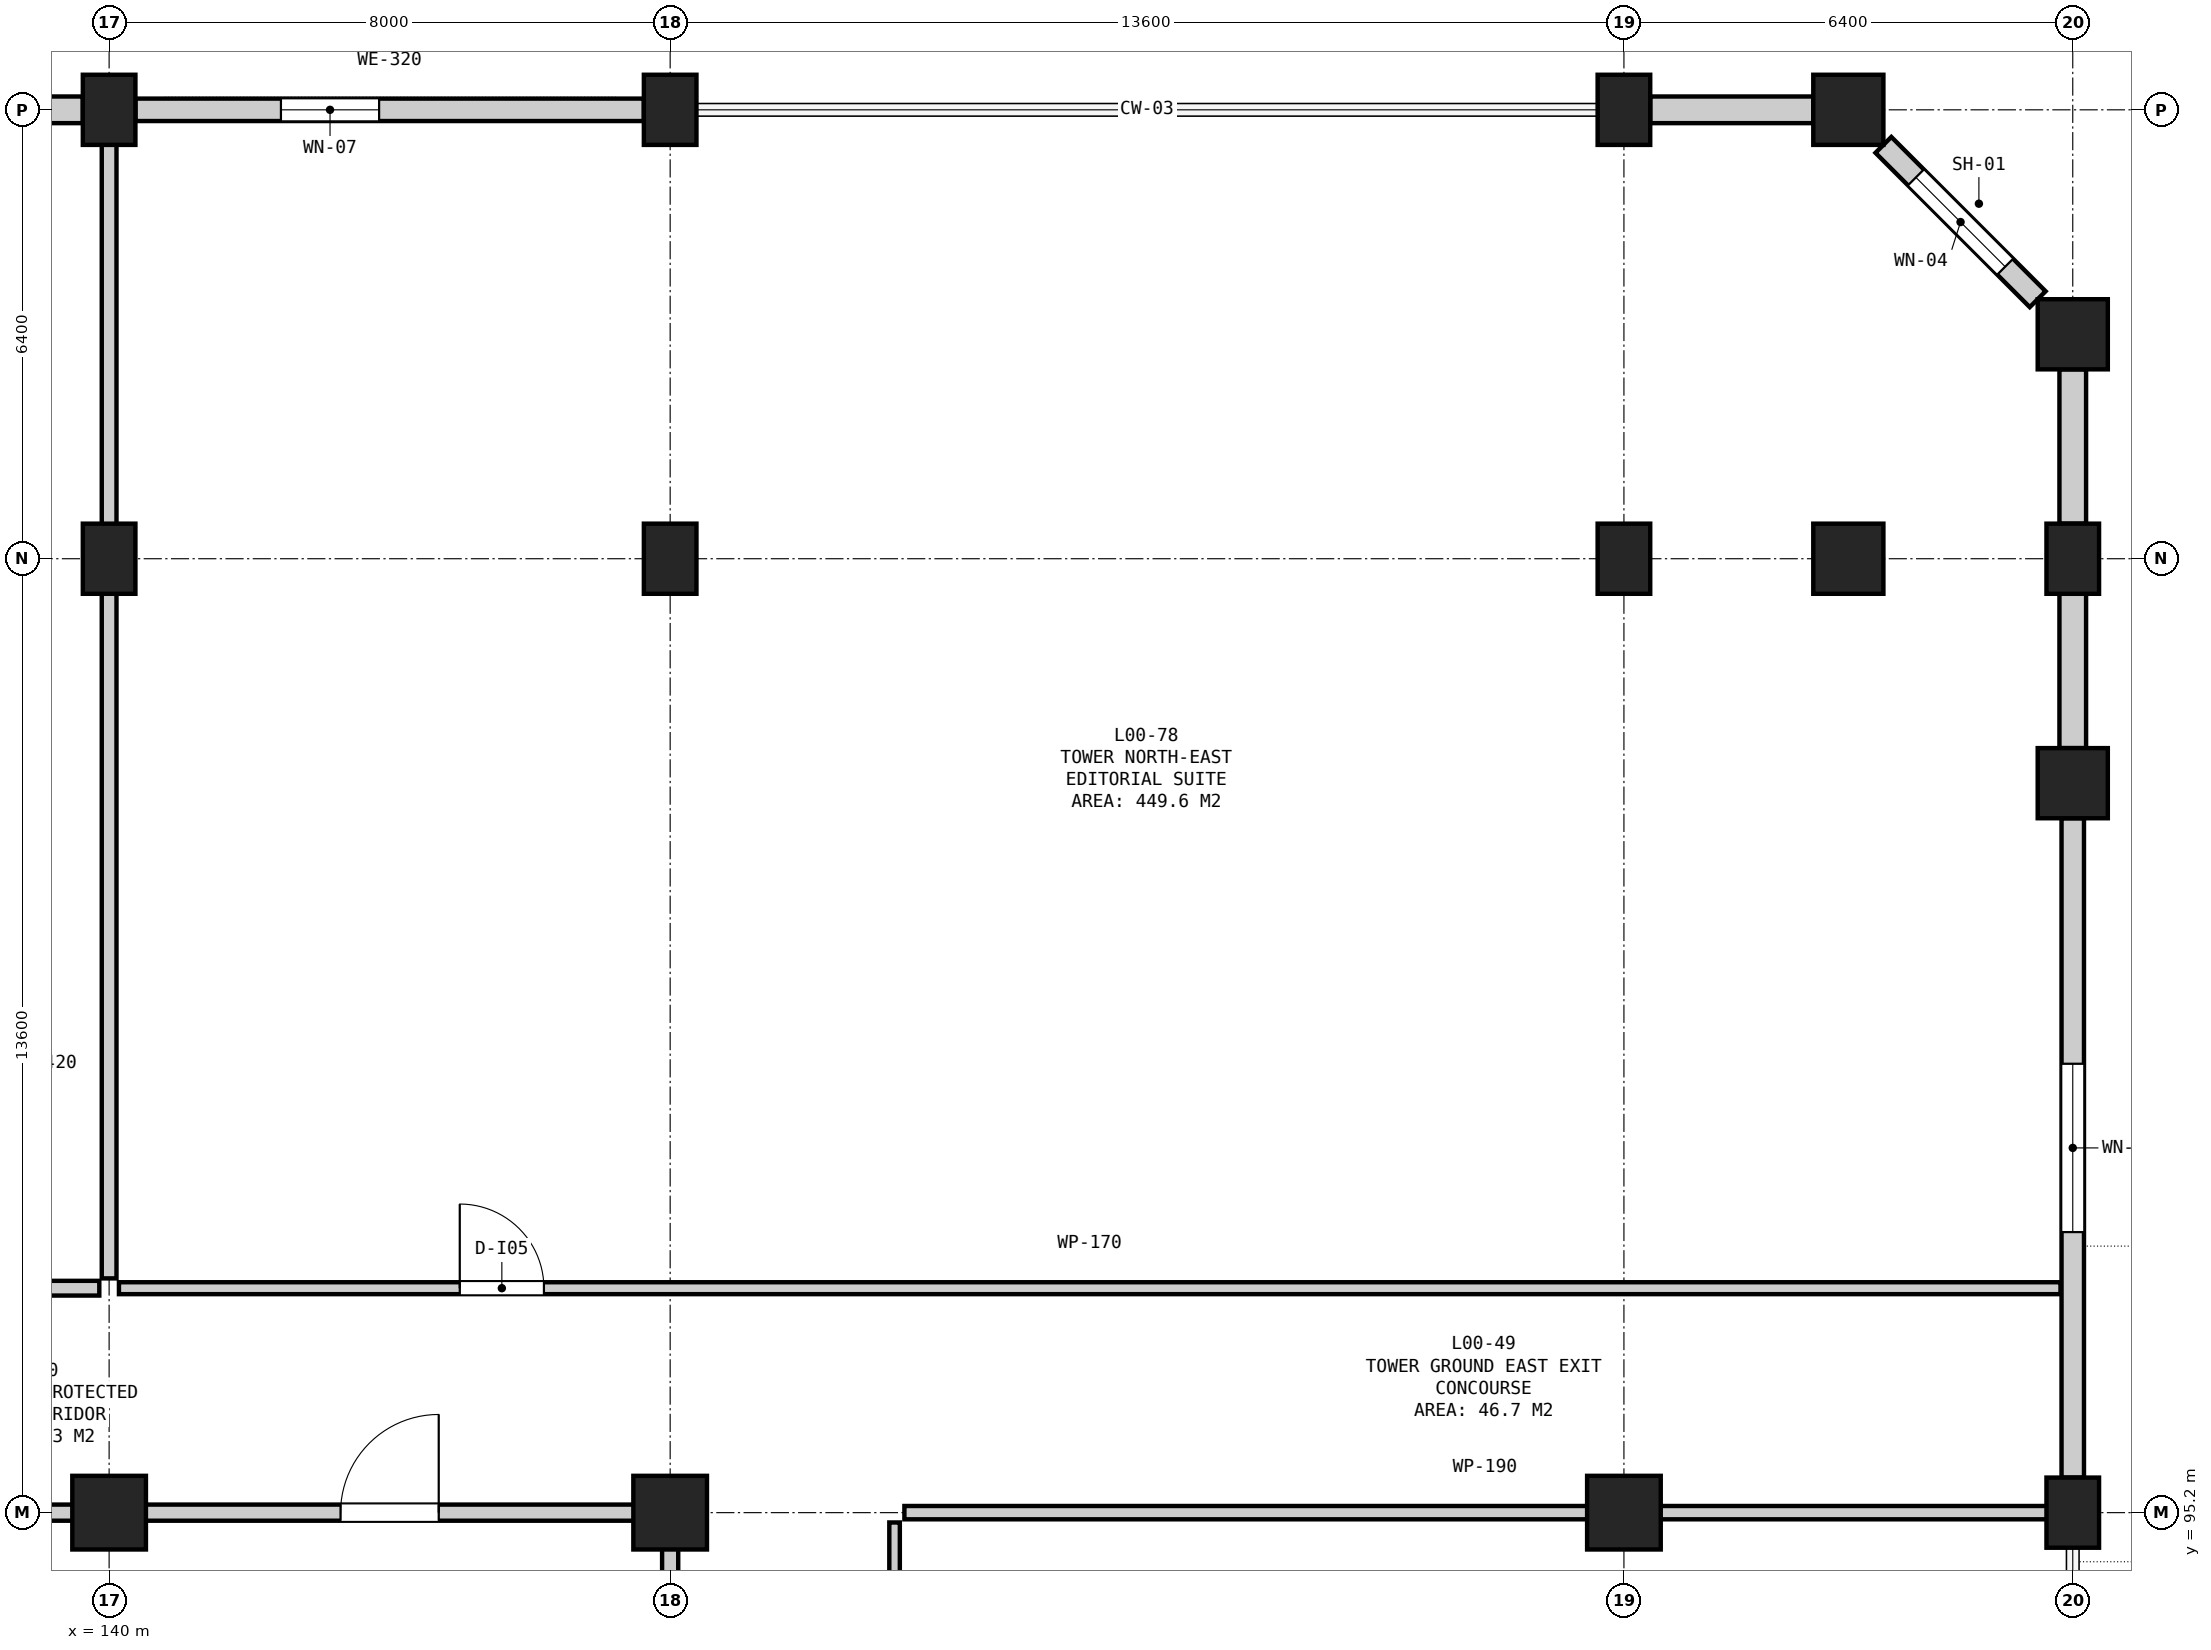
"""IFC4 building model, lengths in metres.
Left out: names, types, materials, properties, quantities, classifications, styles, units other than length and angle.
Written with IfcOpenShell. Run it as: python <this file> out.ifc"""

import sys

from ifc_helpers import new_model, si_unit, direction, frame, frame_2d, origin, origin_2d, place, context, subcontext, project, spatial, rectangle, circle, extrude, element, fill, save


model = new_model("IFC4")
c1 = context("Model", 3, precision=1e-05, world=origin(), true_north=direction((0.0, 1.0)))
c2 = subcontext(c1, "Body", "Model", "MODEL_VIEW")
j1 = project(units=[si_unit("LENGTHUNIT", "METRE"), si_unit("PLANEANGLEUNIT", "RADIAN")], contexts=[c1])
p1 = place(None, origin())
s1 = spatial("IfcSite", under=j1, at=p1, CompositionType="ELEMENT")
p2 = place(p1, origin())
s2 = spatial("IfcBuilding", under=s1, at=p2, CompositionType="ELEMENT")
p3 = place(p2, origin())
s3 = spatial("IfcBuildingStorey", under=s2, at=p3, CompositionType="ELEMENT", Elevation=0.0)
p4 = place(p3, frame((140.0, 95.2, 0.0), z_axis=(0.0, 0.0, 1.0), x_axis=(1.0, 0.0, 0.0)))
e1 = element("IfcColumn", 1, at=p4, inside=s3, PredefinedType="COLUMN", context=c2, shape_type="SweptSolid", body=[
    extrude(rectangle(XDim=1.05, YDim=1.05, at=origin_2d()), origin(), (0.0, 0.0, 1.0), 5.4),
])
for number, where, z_axis, x_axis in (
    (2, (140.0, 108.8, 0.0), (0.0, 0.0, 1.0), (1.0, 0.0, 0.0)),
    (3, (140.0, 115.2, 0.0), (0.0, 0.0, 1.0), (1.0, 0.0, 0.0)),
):
    element("IfcColumn", number, at=place(p3, frame(where, z_axis=z_axis, x_axis=x_axis)), inside=s3, PredefinedType="COLUMN", context=c2, shape_type="SweptSolid", body=[
        extrude(rectangle(XDim=0.75, YDim=1.0, at=origin_2d()), origin(), (0.0, 0.0, 1.0), 5.4),
    ])
p5 = place(p3, frame((148.0, 95.2, 0.0), z_axis=(0.0, 0.0, 1.0), x_axis=(1.0, 0.0, 0.0)))
e4 = element("IfcColumn", 4, at=p5, inside=s3, PredefinedType="COLUMN", context=c2, shape_type="SweptSolid", body=[
    extrude(rectangle(XDim=1.05, YDim=1.05, at=origin_2d()), origin(), (0.0, 0.0, 1.0), 5.4),
])
for number, where, z_axis, x_axis in (
    (5, (148.0, 108.8, 0.0), (0.0, 0.0, 1.0), (1.0, 0.0, 0.0)),
    (6, (148.0, 115.2, 0.0), (0.0, 0.0, 1.0), (1.0, 0.0, 0.0)),
):
    element("IfcColumn", number, at=place(p3, frame(where, z_axis=z_axis, x_axis=x_axis)), inside=s3, PredefinedType="COLUMN", context=c2, shape_type="SweptSolid", body=[
        extrude(rectangle(XDim=0.75, YDim=1.0, at=origin_2d()), origin(), (0.0, 0.0, 1.0), 5.4),
    ])
p6 = place(p3, frame((161.6, 95.2, 0.0), z_axis=(0.0, 0.0, 1.0), x_axis=(1.0, 0.0, 0.0)))
e7 = element("IfcColumn", 7, at=p6, inside=s3, PredefinedType="COLUMN", context=c2, shape_type="SweptSolid", body=[
    extrude(rectangle(XDim=1.05, YDim=1.05, at=origin_2d()), origin(), (0.0, 0.0, 1.0), 5.4),
])
for number, where, z_axis, x_axis in (
    (8, (161.6, 108.8, 0.0), (0.0, 0.0, 1.0), (1.0, 0.0, 0.0)),
    (9, (161.6, 115.2, 0.0), (0.0, 0.0, 1.0), (1.0, 0.0, 0.0)),
):
    element("IfcColumn", number, at=place(p3, frame(where, z_axis=z_axis, x_axis=x_axis)), inside=s3, PredefinedType="COLUMN", context=c2, shape_type="SweptSolid", body=[
        extrude(rectangle(XDim=0.75, YDim=1.0, at=origin_2d()), origin(), (0.0, 0.0, 1.0), 5.4),
    ])
for number, where, z_axis, x_axis in (
    (10, (164.8, 108.8, 0.0), (0.0, 0.0, 1.0), (1.0, 0.0, 0.0)),
    (11, (164.8, 115.2, 0.0), (0.0, 0.0, 1.0), (1.0, 0.0, 0.0)),
):
    element("IfcColumn", number, at=place(p3, frame(where, z_axis=z_axis, x_axis=x_axis)), inside=s3, PredefinedType="COLUMN", context=c2, shape_type="SweptSolid", body=[
        extrude(circle(Radius=0.5, at=origin_2d()), origin(), (0.0, 0.0, 1.0), 5.4),
    ])
p7 = place(p3, frame((168.0, 95.2, 0.0), z_axis=(0.0, 0.0, 1.0), x_axis=(1.0, 0.0, 0.0)))
e12 = element("IfcColumn", 12, at=p7, inside=s3, PredefinedType="COLUMN", context=c2, shape_type="SweptSolid", body=[
    extrude(rectangle(XDim=0.75, YDim=1.0, at=origin_2d()), origin(), (0.0, 0.0, 1.0), 5.4),
])
p8 = place(p3, frame((168.0, 105.6, 0.0), z_axis=(0.0, 0.0, 1.0), x_axis=(1.0, 0.0, 0.0)))
e13 = element("IfcColumn", 13, at=p8, inside=s3, PredefinedType="COLUMN", context=c2, shape_type="SweptSolid", body=[
    extrude(circle(Radius=0.5, at=origin_2d()), origin(), (0.0, 0.0, 1.0), 5.4),
])
p9 = place(p3, frame((168.0, 108.8, 0.0), z_axis=(0.0, 0.0, 1.0), x_axis=(1.0, 0.0, 0.0)))
e14 = element("IfcColumn", 14, at=p9, inside=s3, PredefinedType="COLUMN", context=c2, shape_type="SweptSolid", body=[
    extrude(rectangle(XDim=0.75, YDim=1.0, at=origin_2d()), origin(), (0.0, 0.0, 1.0), 5.4),
])
p10 = place(p3, frame((168.0, 112.0, 0.0), z_axis=(0.0, 0.0, 1.0), x_axis=(1.0, 0.0, 0.0)))
e15 = element("IfcColumn", 15, at=p10, inside=s3, PredefinedType="COLUMN", context=c2, shape_type="SweptSolid", body=[
    extrude(circle(Radius=0.5, at=origin_2d()), origin(), (0.0, 0.0, 1.0), 5.4),
])
p11 = place(p3, frame((168.0, 95.7, 0.0), z_axis=(0.0, 0.0, 1.0), x_axis=(0.0, 1.0, 0.0)))
e16 = element("IfcWall", 16, at=p11, inside=s3, PredefinedType="SOLIDWALL", context=c2, shape_type="SweptSolid", body=[
    extrude(rectangle(XDim=9.4, YDim=0.32, at=frame_2d((4.7, 0.0))), origin(), (0.0, 0.0, 1.0), 4.065),
])
p12 = place(p11, frame((3.5, 0.0, 0.9)))
e17 = element("IfcOpeningElement", 17, at=p12, cuts=e16, PredefinedType="OPENING", context=c2, shape_type="SweptSolid", body=[
    extrude(rectangle(XDim=2.4, YDim=2.2, at=frame_2d((1.2, 1.1))), frame((0.0, 0.172, 0.0), z_axis=(0.0, -1.0, 0.0), x_axis=(1.0, 0.0, 0.0)), (0.0, 0.0, 1.0), 0.344),
])
p13 = place(p3, frame((168.0, 106.1, 0.0), z_axis=(0.0, 0.0, 1.0), x_axis=(0.0, 1.0, 0.0)))
e18 = element("IfcWall", 18, at=p13, inside=s3, PredefinedType="SOLIDWALL", context=c2, shape_type="SweptSolid", body=[
    extrude(rectangle(XDim=2.2, YDim=0.38, at=frame_2d((1.1, 0.0))), origin(), (0.0, 0.0, 1.0), 4.065),
])
p14 = place(p3, frame((168.0, 109.3, 0.0), z_axis=(0.0, 0.0, 1.0), x_axis=(0.0, 1.0, 0.0)))
e19 = element("IfcWall", 19, at=p14, inside=s3, PredefinedType="SOLIDWALL", context=c2, shape_type="SweptSolid", body=[
    extrude(rectangle(XDim=2.2, YDim=0.38, at=frame_2d((1.1, 0.0))), origin(), (0.0, 0.0, 1.0), 4.48),
])
p15 = place(p3, frame((167.5, 112.5, 0.0), z_axis=(0.0, 0.0, 1.0), x_axis=(-0.707106781187, 0.707106781187, 0.0)))
e20 = element("IfcWall", 20, at=p15, inside=s3, PredefinedType="SOLIDWALL", context=c2, shape_type="SweptSolid", body=[
    extrude(rectangle(XDim=3.111, YDim=0.32, at=frame_2d((1.556, 0.0))), origin(), (0.0, 0.0, 1.0), 4.475),
])
p16 = place(p15, frame((0.656, 0.0, 0.9)))
e21 = element("IfcOpeningElement", 21, at=p16, cuts=e20, PredefinedType="OPENING", context=c2, shape_type="SweptSolid", body=[
    extrude(rectangle(XDim=1.8, YDim=1.85, at=frame_2d((0.9, 0.925))), frame((0.0, 0.172, 0.0), z_axis=(0.0, -1.0, 0.0), x_axis=(1.0, 0.0, 0.0)), (0.0, 0.0, 1.0), 0.344),
])
p17 = place(p3, frame((164.3, 115.2, 0.0), z_axis=(0.0, 0.0, 1.0), x_axis=(-1.0, 0.0, 0.0)))
e22 = element("IfcWall", 22, at=p17, inside=s3, PredefinedType="SOLIDWALL", context=c2, shape_type="SweptSolid", body=[
    extrude(rectangle(XDim=2.325, YDim=0.38, at=frame_2d((1.163, 0.0))), origin(), (0.0, 0.0, 1.0), 4.48),
])
p18 = place(p3, frame((147.625, 115.2, 0.0), z_axis=(0.0, 0.0, 1.0), x_axis=(-1.0, 0.0, 0.0)))
e23 = element("IfcWall", 23, at=p18, inside=s3, PredefinedType="SOLIDWALL", context=c2, shape_type="SweptSolid", body=[
    extrude(rectangle(XDim=7.25, YDim=0.32, at=frame_2d((3.625, 0.0))), origin(), (0.0, 0.0, 1.0), 4.48),
])
p19 = place(p18, frame((3.775, 0.0, 0.9)))
e24 = element("IfcOpeningElement", 24, at=p19, cuts=e23, PredefinedType="OPENING", context=c2, shape_type="SweptSolid", body=[
    extrude(rectangle(XDim=1.4, YDim=1.8, at=frame_2d((0.7, 0.9))), frame((0.0, 0.172, 0.0), z_axis=(0.0, -1.0, 0.0), x_axis=(1.0, 0.0, 0.0)), (0.0, 0.0, 1.0), 0.344),
])
p20 = place(p3, frame((139.625, 115.2, 0.0), z_axis=(0.0, 0.0, 1.0), x_axis=(-1.0, 0.0, 0.0)))
e25 = element("IfcWall", 25, at=p20, inside=s3, PredefinedType="SOLIDWALL", context=c2, shape_type="SweptSolid", body=[
    extrude(rectangle(XDim=7.25, YDim=0.38, at=frame_2d((3.625, 0.0))), origin(), (0.0, 0.0, 1.0), 4.465),
])
p21 = place(p20, frame((2.625, 0.0, 0.0)))
e26 = element("IfcOpeningElement", 26, at=p21, cuts=e25, PredefinedType="OPENING", context=c2, shape_type="SweptSolid", body=[
    extrude(rectangle(XDim=2.0, YDim=2.5, at=frame_2d((1.0, 1.25))), frame((0.0, 0.202, 0.0), z_axis=(0.0, -1.0, 0.0), x_axis=(1.0, 0.0, 0.0)), (0.0, 0.0, 1.0), 0.404),
])
p22 = place(p3, frame((136.14, 95.2, 0.0), z_axis=(0.0, 0.0, 1.0), x_axis=(1.0, 0.0, 0.0)))
e27 = element("IfcWall", 27, at=p22, inside=s3, PredefinedType="SOLIDWALL", context=c2, shape_type="SweptSolid", body=[
    extrude(rectangle(XDim=11.72, YDim=0.23, at=frame_2d((5.86, 0.0))), origin(), (0.0, 0.0, 1.0), 4.525),
])
p23 = place(p22, frame((7.16, 0.0, 0.0)))
e28 = element("IfcOpeningElement", 28, at=p23, cuts=e27, PredefinedType="OPENING", context=c2, shape_type="SweptSolid", body=[
    extrude(rectangle(XDim=1.4, YDim=2.2, at=frame_2d((0.7, 1.1))), frame((0.0, 0.127, 0.0), z_axis=(0.0, -1.0, 0.0), x_axis=(1.0, 0.0, 0.0)), (0.0, 0.0, 1.0), 0.254),
])
p24 = place(p3, frame((148.0, 91.54, 0.0), z_axis=(0.0, 0.0, 1.0), x_axis=(0.0, 1.0, 0.0)))
e29 = element("IfcWall", 29, at=p24, inside=s3, PredefinedType="SOLIDWALL", context=c2, shape_type="SweptSolid", body=[
    extrude(rectangle(XDim=3.52, YDim=0.23, at=frame_2d((1.76, 0.0))), origin(), (0.0, 0.0, 1.0), 4.425),
])
p25 = place(p3, frame((132.14, 98.4, 0.0), z_axis=(0.0, 0.0, 1.0), x_axis=(1.0, 0.0, 0.0)))
e30 = element("IfcWall", 30, at=p25, inside=s3, PredefinedType="SOLIDWALL", context=c2, shape_type="SweptSolid", body=[
    extrude(rectangle(XDim=7.72, YDim=0.21, at=frame_2d((3.86, 0.0))), origin(), (0.0, 0.0, 1.0), 5.08),
])
p26 = place(p25, frame((3.06, 0.0, 0.0)))
e31 = element("IfcOpeningElement", 31, at=p26, cuts=e30, PredefinedType="OPENING", context=c2, shape_type="SweptSolid", body=[
    extrude(rectangle(XDim=1.6, YDim=2.2, at=frame_2d((0.8, 1.1))), frame((0.0, 0.117, 0.0), z_axis=(0.0, -1.0, 0.0), x_axis=(1.0, 0.0, 0.0)), (0.0, 0.0, 1.0), 0.234),
])
p27 = place(p3, frame((140.0, 98.54, 0.0), z_axis=(0.0, 0.0, 1.0), x_axis=(0.0, 1.0, 0.0)))
e32 = element("IfcWall", 32, at=p27, inside=s3, PredefinedType="SOLIDWALL", context=c2, shape_type="SweptSolid", body=[
    extrude(rectangle(XDim=16.555, YDim=0.21, at=frame_2d((8.277, 0.0))), origin(), (0.0, 0.0, 1.0), 4.025),
])
p28 = place(p3, frame((151.34, 95.2, 0.0), z_axis=(0.0, 0.0, 1.0), x_axis=(1.0, 0.0, 0.0)))
e33 = element("IfcWall", 33, at=p28, inside=s3, PredefinedType="PARTITIONING", context=c2, shape_type="SweptSolid", body=[
    extrude(rectangle(XDim=16.555, YDim=0.19, at=frame_2d((8.277, 0.0))), origin(), (0.0, 0.0, 1.0), 4.025),
])
p29 = place(p3, frame((151.2, 76.0, 0.0), z_axis=(0.0, 0.0, 1.0), x_axis=(0.0, 1.0, 0.0)))
e34 = element("IfcWall", 34, at=p29, inside=s3, PredefinedType="PARTITIONING", context=c2, shape_type="SweptSolid", body=[
    extrude(rectangle(XDim=19.06, YDim=0.15, at=frame_2d((9.53, 0.0))), origin(), (0.0, 0.0, 1.0), 5.08),
])
p30 = place(p29, frame((10.6, 0.0, 0.0)))
e35 = element("IfcOpeningElement", 35, at=p30, cuts=e34, PredefinedType="OPENING", context=c2, shape_type="SweptSolid", body=[
    extrude(rectangle(XDim=1.2, YDim=2.15, at=frame_2d((0.6, 1.075))), frame((0.0, 0.087, 0.0), z_axis=(0.0, -1.0, 0.0), x_axis=(1.0, 0.0, 0.0)), (0.0, 0.0, 1.0), 0.174),
])
p31 = place(p3, frame((140.14, 98.4, 0.0), z_axis=(0.0, 0.0, 1.0), x_axis=(1.0, 0.0, 0.0)))
e36 = element("IfcWall", 36, at=p31, inside=s3, PredefinedType="PARTITIONING", context=c2, shape_type="SweptSolid", body=[
    extrude(rectangle(XDim=27.685, YDim=0.17, at=frame_2d((13.843, 0.0))), origin(), (0.0, 0.0, 1.0), 5.08),
])
p32 = place(p31, frame((4.86, 0.0, 0.0)))
e37 = element("IfcOpeningElement", 37, at=p32, cuts=e36, PredefinedType="OPENING", context=c2, shape_type="SweptSolid", body=[
    extrude(rectangle(XDim=1.2, YDim=2.15, at=frame_2d((0.6, 1.075))), frame((0.0, 0.097, 0.0), z_axis=(0.0, -1.0, 0.0), x_axis=(1.0, 0.0, 0.0)), (0.0, 0.0, 1.0), 0.194),
])
p33 = place(p12, origin())
e38 = element("IfcWindow", 38, at=p33, inside=s3, PartitioningType="DOUBLE_PANEL_VERTICAL", PredefinedType="WINDOW", context=c2, shape_type="SweptSolid", body=[
    extrude(rectangle(XDim=2.4, YDim=2.2, at=frame_2d((1.2, 1.1))), frame((0.0, 0.03, 0.0), z_axis=(0.0, -1.0, 0.0), x_axis=(1.0, 0.0, 0.0)), (0.0, 0.0, 1.0), 0.06),
])
fill(e17, e38)
p34 = place(p16, origin())
e39 = element("IfcWindow", 39, at=p34, inside=s3, PartitioningType="DOUBLE_PANEL_VERTICAL", PredefinedType="WINDOW", context=c2, shape_type="SweptSolid", body=[
    extrude(rectangle(XDim=1.8, YDim=1.85, at=frame_2d((0.9, 0.925))), frame((0.0, 0.03, 0.0), z_axis=(0.0, -1.0, 0.0), x_axis=(1.0, 0.0, 0.0)), (0.0, 0.0, 1.0), 0.06),
])
fill(e21, e39)
p35 = place(p19, origin())
e40 = element("IfcWindow", 40, at=p35, inside=s3, PartitioningType="SINGLE_PANEL", PredefinedType="WINDOW", context=c2, shape_type="SweptSolid", body=[
    extrude(rectangle(XDim=1.4, YDim=1.8, at=frame_2d((0.7, 0.9))), frame((0.0, 0.03, 0.0), z_axis=(0.0, -1.0, 0.0), x_axis=(1.0, 0.0, 0.0)), (0.0, 0.0, 1.0), 0.06),
])
fill(e24, e40)
p36 = place(p23, origin())
e41 = element("IfcDoor", 41, at=p36, inside=s3, OperationType="SINGLE_SWING_RIGHT", PredefinedType="DOOR", context=c2, shape_type="SweptSolid", body=[
    extrude(rectangle(XDim=1.4, YDim=2.2, at=frame_2d((0.7, 1.1))), frame((0.0, 0.025, 0.0), z_axis=(0.0, -1.0, 0.0), x_axis=(1.0, 0.0, 0.0)), (0.0, 0.0, 1.0), 0.05),
])
fill(e28, e41)
p37 = place(p32, origin())
e42 = element("IfcDoor", 42, at=p37, inside=s3, OperationType="SINGLE_SWING_LEFT", PredefinedType="DOOR", context=c2, shape_type="SweptSolid", body=[
    extrude(rectangle(XDim=1.2, YDim=2.15, at=frame_2d((0.6, 1.075))), frame((0.0, 0.025, 0.0), z_axis=(0.0, -1.0, 0.0), x_axis=(1.0, 0.0, 0.0)), (0.0, 0.0, 1.0), 0.05),
])
fill(e37, e42)
save(model, sys.argv[1])
